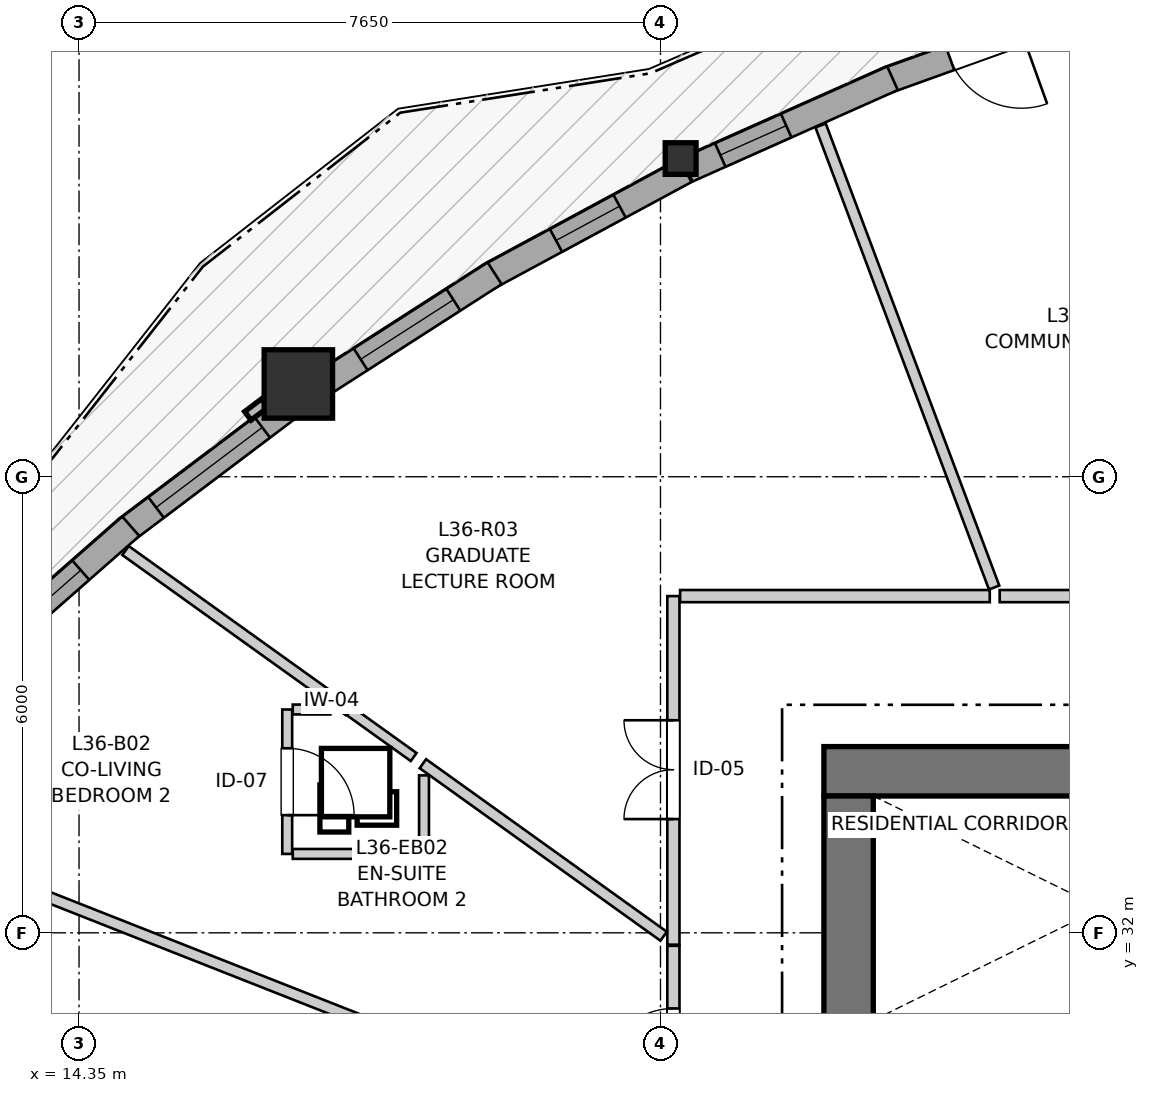
"""IFC4 building model, lengths in metres.
Left out: names, types, materials, properties, quantities, classifications, styles, units other than length and angle.
Written with IfcOpenShell. Run it as: python <this file> out.ifc"""

import sys

from ifc_helpers import new_model, si_unit, direction, frame, frame_2d, origin, origin_2d, place, context, subcontext, project, spatial, rectangle, i_section, extrude, source, transform, mapped, element, fill, save


model = new_model("IFC4")
c1 = context("Model", 3, precision=1e-05, world=origin(), true_north=direction((0.0, 1.0)))
c2 = subcontext(c1, "Body", "Model", "MODEL_VIEW")
j1 = project(units=[si_unit("LENGTHUNIT", "METRE"), si_unit("PLANEANGLEUNIT", "RADIAN")], contexts=[c1])
p1 = place(None, origin())
s1 = spatial("IfcSite", under=j1, at=p1, CompositionType="ELEMENT")
p2 = place(p1, origin())
s2 = spatial("IfcBuilding", under=s1, at=p2, CompositionType="ELEMENT")
p3 = place(p2, frame((0.0, 0.0, 121.6)))
s3 = spatial("IfcBuildingStorey", under=s2, at=p3, CompositionType="ELEMENT", Elevation=121.6)
p4 = place(p3, frame((36.55, 34.125, 0.0), z_axis=(0.0, 0.0, 1.0), x_axis=(-1.0, 0.0, 0.0)))
e1 = element("IfcWall", 1, at=p4, inside=s3, PredefinedType="SHEAR", context=c2, shape_type="SweptSolid", body=[
    extrude(rectangle(XDim=12.4, YDim=0.65, at=frame_2d((6.2, 0.0))), origin(), (0.0, 0.0, 1.0), 2.95),
])
p5 = place(p3, frame((24.475, 33.8, 0.0), z_axis=(0.0, 0.0, 1.0), x_axis=(0.0, -1.0, 0.0)))
e2 = element("IfcWall", 2, at=p5, inside=s3, PredefinedType="SHEAR", context=c2, shape_type="SweptSolid", body=[
    extrude(rectangle(XDim=15.6, YDim=0.65, at=frame_2d((7.8, 0.0))), origin(), (0.0, 0.0, 1.0), 2.95),
])
p6 = place(p5, frame((7.05, 0.0, 0.0)))
e3 = element("IfcOpeningElement", 3, at=p6, cuts=e2, PredefinedType="OPENING", context=c2, shape_type="SweptSolid", body=[
    extrude(rectangle(XDim=1.5, YDim=2.15, at=frame_2d((0.75, 1.075))), frame((0.0, 0.335, 0.0), z_axis=(0.0, -1.0, 0.0), x_axis=(1.0, 0.0, 0.0)), (0.0, 0.0, 1.0), 0.67),
])
p7 = place(p5, frame((3.52, 0.0, 0.0)))
e4 = element("IfcOpeningElement", 4, at=p7, cuts=e2, PredefinedType="OPENING", context=c2, shape_type="SweptSolid", body=[
    extrude(rectangle(XDim=0.86, YDim=2.05, at=frame_2d((0.43, 1.025))), frame((0.0, 0.335, 0.0), z_axis=(0.0, -1.0, 0.0), x_axis=(1.0, 0.0, 0.0)), (0.0, 0.0, 1.0), 0.67),
])
p8 = place(p5, frame((11.22, 0.0, 0.0)))
e5 = element("IfcOpeningElement", 5, at=p8, cuts=e2, PredefinedType="OPENING", context=c2, shape_type="SweptSolid", body=[
    extrude(rectangle(XDim=0.86, YDim=2.05, at=frame_2d((0.43, 1.025))), frame((0.0, 0.335, 0.0), z_axis=(0.0, -1.0, 0.0), x_axis=(1.0, 0.0, 0.0)), (0.0, 0.0, 1.0), 0.67),
])
m1 = source(origin(), c2, "Body", "SweptSolid", [
    extrude(i_section(OverallWidth=0.406, OverallDepth=0.416, WebThickness=0.027, FlangeThickness=0.044, FilletRadius=0.015, at=origin_2d()), origin(), (0.0, 0.0, 1.0), 2.95),
])
p9 = place(p3, frame((22.265, 42.186, 0.0), z_axis=(0.0, 0.0, 1.0), x_axis=(1.0, 0.0, 0.0)))
e6 = element("IfcColumn", 6, at=p9, inside=s3, PredefinedType="PILASTER", context=c2, shape_type="MappedRepresentation", body=[
    mapped(m1, transform((0.0, 0.0, 0.0), x_axis=(1.0, 0.0, 0.0), y_axis=(0.0, 1.0, 0.0), z_axis=(0.0, 0.0, 1.0), scale=1.0)),
])
m2 = source(origin(), c2, "Body", "SweptSolid", [
    extrude(rectangle(XDim=0.9, YDim=0.9, at=origin_2d()), origin(), (0.0, 0.0, 1.0), 2.95),
])
p10 = place(p3, frame((17.236, 39.221, 0.0), z_axis=(0.0, 0.0, 1.0), x_axis=(1.0, 0.0, 0.0)))
e7 = element("IfcColumn", 7, at=p10, inside=s3, PredefinedType="COLUMN", context=c2, shape_type="MappedRepresentation", body=[
    mapped(m2, transform((0.0, 0.0, 0.0), x_axis=(1.0, 0.0, 0.0), y_axis=(0.0, 1.0, 0.0), z_axis=(0.0, 0.0, 1.0), scale=1.0)),
])
p11 = place(p3, frame((27.586, 44.149, 0.0), z_axis=(0.0, 0.0, 1.0), x_axis=(-0.941112277287, -0.338094190338, 0.0)))
e8 = element("IfcWall", 8, at=p11, inside=s3, PredefinedType="SOLIDWALL", context=c2, shape_type="SweptSolid", body=[
    extrude(rectangle(XDim=2.779, YDim=0.34, at=frame_2d((1.39, 0.0))), origin(), (0.0, 0.0, 1.0), 2.48),
])
p12 = place(p11, frame((0.89, 0.0, 0.0)))
e9 = element("IfcOpeningElement", 9, at=p12, cuts=e8, PredefinedType="OPENING", context=c2, shape_type="SweptSolid", body=[
    extrude(rectangle(XDim=1.0, YDim=2.1, at=frame_2d((0.5, 1.05))), frame((0.0, 0.18, 0.0), z_axis=(0.0, -1.0, 0.0), x_axis=(1.0, 0.0, 0.0)), (0.0, 0.0, 1.0), 0.36),
])
p13 = place(p3, frame((25.053, 43.243, 0.0), z_axis=(0.0, 0.0, 1.0), x_axis=(-0.91339900063, -0.407065431655, 0.0)))
e10 = element("IfcWall", 10, at=p13, inside=s3, PredefinedType="SOLIDWALL", context=c2, shape_type="SweptSolid", body=[
    extrude(rectangle(XDim=2.956, YDim=0.34, at=frame_2d((1.478, 0.0))), origin(), (0.0, 0.0, 1.0), 2.48),
])
p14 = place(p13, frame((1.531, 0.0, 0.82)))
e11 = element("IfcOpeningElement", 11, at=p14, cuts=e10, PredefinedType="OPENING", context=c2, shape_type="SweptSolid", body=[
    extrude(rectangle(XDim=0.95, YDim=1.35, at=frame_2d((0.475, 0.675))), frame((0.0, 0.18, 0.0), z_axis=(0.0, -1.0, 0.0), x_axis=(1.0, 0.0, 0.0)), (0.0, 0.0, 1.0), 0.36),
])
p15 = place(p3, frame((22.328, 42.027, 0.0), z_axis=(0.0, 0.0, 1.0), x_axis=(-0.880092136679, -0.474802939077, 0.0)))
e12 = element("IfcWall", 12, at=p15, inside=s3, PredefinedType="SOLIDWALL", context=c2, shape_type="SweptSolid", body=[
    extrude(rectangle(XDim=2.94, YDim=0.34, at=frame_2d((1.47, 0.0))), origin(), (0.0, 0.0, 1.0), 2.48),
])
p16 = place(p15, frame((0.985, 0.0, 0.82)))
e13 = element("IfcOpeningElement", 13, at=p16, cuts=e12, PredefinedType="OPENING", context=c2, shape_type="SweptSolid", body=[
    extrude(rectangle(XDim=0.95, YDim=1.35, at=frame_2d((0.475, 0.675))), frame((0.0, 0.18, 0.0), z_axis=(0.0, -1.0, 0.0), x_axis=(1.0, 0.0, 0.0)), (0.0, 0.0, 1.0), 0.36),
])
p17 = place(p3, frame((19.818, 40.677, 0.0), z_axis=(0.0, 0.0, 1.0), x_axis=(-0.841503814414, -0.540251173369, 0.0)))
e14 = element("IfcWall", 14, at=p17, inside=s3, PredefinedType="SOLIDWALL", context=c2, shape_type="SweptSolid", body=[
    extrude(rectangle(XDim=2.729, YDim=0.34, at=frame_2d((1.365, 0.0))), origin(), (0.0, 0.0, 1.0), 2.48),
])
p18 = place(p17, frame((0.645, 0.0, 0.82)))
e15 = element("IfcOpeningElement", 15, at=p18, cuts=e14, PredefinedType="OPENING", context=c2, shape_type="SweptSolid", body=[
    extrude(rectangle(XDim=1.45, YDim=1.25, at=frame_2d((0.725, 0.625))), frame((0.0, 0.18, 0.0), z_axis=(0.0, -1.0, 0.0), x_axis=(1.0, 0.0, 0.0)), (0.0, 0.0, 1.0), 0.36),
])
p19 = place(p3, frame((17.154, 38.947, 0.0), z_axis=(0.0, 0.0, 1.0), x_axis=(-0.798332692302, -0.602216665663, 0.0)))
e16 = element("IfcWall", 16, at=p19, inside=s3, PredefinedType="SOLIDWALL", context=c2, shape_type="SweptSolid", body=[
    extrude(rectangle(XDim=2.746, YDim=0.34, at=frame_2d((1.373, 0.0))), origin(), (0.0, 0.0, 1.0), 2.48),
])
p20 = place(p19, frame((0.493, 0.0, 0.82)))
e17 = element("IfcOpeningElement", 17, at=p20, cuts=e16, PredefinedType="OPENING", context=c2, shape_type="SweptSolid", body=[
    extrude(rectangle(XDim=1.75, YDim=1.3, at=frame_2d((0.875, 0.65))), frame((0.0, 0.18, 0.0), z_axis=(0.0, -1.0, 0.0), x_axis=(1.0, 0.0, 0.0)), (0.0, 0.0, 1.0), 0.36),
])
p21 = place(p3, frame((15.031, 37.349, 0.0), z_axis=(0.0, 0.0, 1.0), x_axis=(-0.751472812955, -0.659764057364, 0.0)))
e18 = element("IfcWall", 18, at=p21, inside=s3, PredefinedType="SOLIDWALL", context=c2, shape_type="SweptSolid", body=[
    extrude(rectangle(XDim=2.99, YDim=0.34, at=frame_2d((1.495, 0.0))), origin(), (0.0, 0.0, 1.0), 2.48),
])
p22 = place(p21, frame((0.875, 0.0, 0.82)))
e19 = element("IfcOpeningElement", 19, at=p22, cuts=e18, PredefinedType="OPENING", context=c2, shape_type="SweptSolid", body=[
    extrude(rectangle(XDim=1.45, YDim=1.25, at=frame_2d((0.725, 0.625))), frame((0.0, 0.18, 0.0), z_axis=(0.0, -1.0, 0.0), x_axis=(1.0, 0.0, 0.0)), (0.0, 0.0, 1.0), 0.36),
])
p23 = place(p3, frame((22.17, 31.844, 0.0), z_axis=(0.0, 0.0, 1.0), x_axis=(0.0, 1.0, 0.0)))
e20 = element("IfcWall", 20, at=p23, inside=s3, PredefinedType="PARTITIONING", context=c2, shape_type="SweptSolid", body=[
    extrude(rectangle(XDim=4.586, YDim=0.16, at=frame_2d((2.293, 0.0))), origin(), (0.0, 0.0, 1.0), 2.95),
])
p24 = place(p23, frame((1.653, 0.0, 0.0)))
e21 = element("IfcOpeningElement", 21, at=p24, cuts=e20, PredefinedType="OPENING", context=c2, shape_type="SweptSolid", body=[
    extrude(rectangle(XDim=1.3, YDim=2.1, at=frame_2d((0.65, 1.05))), frame((0.0, 0.09, 0.0), z_axis=(0.0, -1.0, 0.0), x_axis=(1.0, 0.0, 0.0)), (0.0, 0.0, 1.0), 0.18),
])
p25 = place(p3, frame((26.463, 36.43, 0.0), z_axis=(0.0, 0.0, 1.0), x_axis=(1.0, 0.0, 0.0)))
e22 = element("IfcWall", 22, at=p25, inside=s3, PredefinedType="PARTITIONING", context=c2, shape_type="SweptSolid", body=[
    extrude(rectangle(XDim=3.585, YDim=0.16, at=frame_2d((1.792, 0.0))), origin(), (0.0, 0.0, 1.0), 2.95),
])
p26 = place(p25, frame((1.119, 0.0, 0.0)))
e23 = element("IfcOpeningElement", 23, at=p26, cuts=e22, PredefinedType="OPENING", context=c2, shape_type="SweptSolid", body=[
    extrude(rectangle(XDim=1.3, YDim=2.1, at=frame_2d((0.65, 1.05))), frame((0.0, 0.09, 0.0), z_axis=(0.0, -1.0, 0.0), x_axis=(1.0, 0.0, 0.0)), (0.0, 0.0, 1.0), 0.18),
])
p27 = place(p3, frame((22.17, 29.209, 0.0), z_axis=(0.0, 0.0, 1.0), x_axis=(0.0, 1.0, 0.0)))
e24 = element("IfcWall", 24, at=p27, inside=s3, PredefinedType="PARTITIONING", context=c2, shape_type="SweptSolid", body=[
    extrude(rectangle(XDim=2.62, YDim=0.16, at=frame_2d((1.31, 0.0))), origin(), (0.0, 0.0, 1.0), 2.95),
])
p28 = place(p27, frame((0.875, 0.0, 0.0)))
e25 = element("IfcOpeningElement", 25, at=p28, cuts=e24, PredefinedType="OPENING", context=c2, shape_type="SweptSolid", body=[
    extrude(rectangle(XDim=0.92, YDim=2.1, at=frame_2d((0.46, 1.05))), frame((0.0, 0.09, 0.0), z_axis=(0.0, -1.0, 0.0), x_axis=(1.0, 0.0, 0.0)), (0.0, 0.0, 1.0), 0.18),
])
p29 = place(p3, frame((17.089, 34.938, 0.0), z_axis=(0.0, 0.0, 1.0), x_axis=(0.0, -1.0, 0.0)))
e26 = element("IfcWall", 26, at=p29, inside=s3, PredefinedType="PARTITIONING", context=c2, shape_type="SweptSolid", body=[
    extrude(rectangle(XDim=1.9, YDim=0.13, at=frame_2d((0.95, 0.0))), origin(), (0.0, 0.0, 1.0), 2.95),
])
p30 = place(p29, frame((0.51, 0.0, 0.0)))
e27 = element("IfcOpeningElement", 27, at=p30, cuts=e26, PredefinedType="OPENING", context=c2, shape_type="SweptSolid", body=[
    extrude(rectangle(XDim=0.88, YDim=2.05, at=frame_2d((0.44, 1.025))), frame((0.0, 0.075, 0.0), z_axis=(0.0, -1.0, 0.0), x_axis=(1.0, 0.0, 0.0)), (0.0, 0.0, 1.0), 0.15),
])
p31 = place(p3, frame((11.228, 33.54, 0.0), z_axis=(0.0, 0.0, 1.0), x_axis=(0.930301058265, -0.366796866114, 0.0)))
e28 = element("IfcWall", 28, at=p31, inside=s3, PredefinedType="PARTITIONING", context=c2, shape_type="SweptSolid", body=[
    extrude(rectangle(XDim=11.639, YDim=0.145, at=frame_2d((5.82, 0.0))), origin(), (0.0, 0.0, 1.0), 2.95),
])
p32 = place(p3, frame((24.107, 42.621, 0.0), z_axis=(0.0, 0.0, 1.0), x_axis=(0.351605509999, -0.93614826034, 0.0)))
e29 = element("IfcWall", 29, at=p32, inside=s3, PredefinedType="PARTITIONING", context=c2, shape_type="SweptSolid", body=[
    extrude(rectangle(XDim=6.493, YDim=0.145, at=frame_2d((3.247, 0.0))), origin(), (0.0, 0.0, 1.0), 2.95),
])
p33 = place(p3, frame((22.258, 36.43, 0.0), z_axis=(0.0, 0.0, 1.0), x_axis=(1.0, 0.0, 0.0)))
e30 = element("IfcWall", 30, at=p33, inside=s3, PredefinedType="PARTITIONING", context=c2, shape_type="SweptSolid", body=[
    extrude(rectangle(XDim=4.074, YDim=0.16, at=frame_2d((2.037, 0.0))), origin(), (0.0, 0.0, 1.0), 2.588),
])
p34 = place(p3, frame((18.874, 34.225, 0.0), z_axis=(0.0, 0.0, 1.0), x_axis=(0.812826521731, -0.582505833079, 0.0)))
e31 = element("IfcWall", 31, at=p34, inside=s3, PredefinedType="PARTITIONING", context=c2, shape_type="SweptSolid", body=[
    extrude(rectangle(XDim=3.896, YDim=0.145, at=frame_2d((1.948, 0.0))), origin(), (0.0, 0.0, 1.0), 2.95),
])
p35 = place(p3, frame((14.961, 37.03, 0.0), z_axis=(0.0, 0.0, 1.0), x_axis=(0.812838437321, -0.582489205748, 0.0)))
e32 = element("IfcWall", 32, at=p35, inside=s3, PredefinedType="PARTITIONING", context=c2, shape_type="SweptSolid", body=[
    extrude(rectangle(XDim=3.616, YDim=0.145, at=frame_2d((1.808, 0.0))), origin(), (0.0, 0.0, 1.0), 2.95),
])
p36 = place(p3, frame((17.162, 33.038, 0.0), z_axis=(0.0, 0.0, 1.0), x_axis=(1.0, 0.0, 0.0)))
e33 = element("IfcWall", 33, at=p36, inside=s3, PredefinedType="PARTITIONING", context=c2, shape_type="SweptSolid", body=[
    extrude(rectangle(XDim=1.727, YDim=0.13, at=frame_2d((0.863, 0.0))), origin(), (0.0, 0.0, 1.0), 2.95),
])
p37 = place(p3, frame((18.889, 33.111, 0.0), z_axis=(0.0, 0.0, 1.0), x_axis=(0.0, 1.0, 0.0)))
e34 = element("IfcWall", 34, at=p37, inside=s3, PredefinedType="PARTITIONING", context=c2, shape_type="SweptSolid", body=[
    extrude(rectangle(XDim=0.96, YDim=0.13, at=frame_2d((0.48, 0.0))), origin(), (0.0, 0.0, 1.0), 2.95),
])
p38 = place(p3, frame((17.913, 34.914, 0.0), z_axis=(0.0, 0.0, 1.0), x_axis=(0.812774229327, -0.582578794792, 0.0)))
e35 = element("IfcWall", 35, at=p38, inside=s3, PredefinedType="PARTITIONING", context=c2, shape_type="SweptSolid", body=[
    extrude(rectangle(XDim=1.033, YDim=0.13, at=frame_2d((0.517, 0.0))), origin(), (0.0, 0.0, 1.0), 2.95),
])
p39 = place(p3, frame((17.162, 34.938, 0.0), z_axis=(0.0, 0.0, 1.0), x_axis=(1.0, 0.0, 0.0)))
e36 = element("IfcWall", 36, at=p39, inside=s3, PredefinedType="PARTITIONING", context=c2, shape_type="SweptSolid", body=[
    extrude(rectangle(XDim=0.495, YDim=0.13, at=frame_2d((0.247, 0.0))), origin(), (0.0, 0.0, 1.0), 2.95),
])
m3 = source(origin(), c2, "Body", "SweptSolid", [
    extrude(rectangle(XDim=0.95, YDim=1.35, at=frame_2d((0.475, 0.675))), frame((0.0, 0.03, 0.0), z_axis=(0.0, -1.0, 0.0), x_axis=(1.0, 0.0, 0.0)), (0.0, 0.0, 1.0), 0.06),
])
p40 = place(p14, origin())
e37 = element("IfcWindow", 37, at=p40, inside=s3, PartitioningType="SINGLE_PANEL", PredefinedType="WINDOW", context=c2, shape_type="MappedRepresentation", body=[
    mapped(m3, transform((0.0, 0.0, 0.0), x_axis=(1.0, 0.0, 0.0), y_axis=(0.0, 1.0, 0.0), z_axis=(0.0, 0.0, 1.0), scale=1.0)),
])
fill(e11, e37)
p41 = place(p16, origin())
e38 = element("IfcWindow", 38, at=p41, inside=s3, PartitioningType="SINGLE_PANEL", PredefinedType="WINDOW", context=c2, shape_type="MappedRepresentation", body=[
    mapped(m3, transform((0.0, 0.0, 0.0), x_axis=(1.0, 0.0, 0.0), y_axis=(0.0, 1.0, 0.0), z_axis=(0.0, 0.0, 1.0), scale=1.0)),
])
fill(e13, e38)
m4 = source(origin(), c2, "Body", "SweptSolid", [
    extrude(rectangle(XDim=1.45, YDim=1.25, at=frame_2d((0.725, 0.625))), frame((0.0, 0.03, 0.0), z_axis=(0.0, -1.0, 0.0), x_axis=(1.0, 0.0, 0.0)), (0.0, 0.0, 1.0), 0.06),
])
p42 = place(p18, origin())
e39 = element("IfcWindow", 39, at=p42, inside=s3, PartitioningType="SINGLE_PANEL", PredefinedType="WINDOW", context=c2, shape_type="MappedRepresentation", body=[
    mapped(m4, transform((0.0, 0.0, 0.0), x_axis=(1.0, 0.0, 0.0), y_axis=(0.0, 1.0, 0.0), z_axis=(0.0, 0.0, 1.0), scale=1.0)),
])
fill(e15, e39)
m5 = source(origin(), c2, "Body", "SweptSolid", [
    extrude(rectangle(XDim=1.75, YDim=1.3, at=frame_2d((0.875, 0.65))), frame((0.0, 0.03, 0.0), z_axis=(0.0, -1.0, 0.0), x_axis=(1.0, 0.0, 0.0)), (0.0, 0.0, 1.0), 0.06),
])
p43 = place(p20, origin())
e40 = element("IfcWindow", 40, at=p43, inside=s3, PartitioningType="SINGLE_PANEL", PredefinedType="WINDOW", context=c2, shape_type="MappedRepresentation", body=[
    mapped(m5, transform((0.0, 0.0, 0.0), x_axis=(1.0, 0.0, 0.0), y_axis=(0.0, 1.0, 0.0), z_axis=(0.0, 0.0, 1.0), scale=1.0)),
])
fill(e17, e40)
p44 = place(p22, origin())
e41 = element("IfcWindow", 41, at=p44, inside=s3, PartitioningType="SINGLE_PANEL", PredefinedType="WINDOW", context=c2, shape_type="MappedRepresentation", body=[
    mapped(m4, transform((0.0, 0.0, 0.0), x_axis=(1.0, 0.0, 0.0), y_axis=(0.0, 1.0, 0.0), z_axis=(0.0, 0.0, 1.0), scale=1.0)),
])
fill(e19, e41)
m6 = source(origin(), c2, "Body", "SweptSolid", [
    extrude(rectangle(XDim=1.0, YDim=2.1, at=frame_2d((0.5, 1.05))), frame((0.0, 0.025, 0.0), z_axis=(0.0, -1.0, 0.0), x_axis=(1.0, 0.0, 0.0)), (0.0, 0.0, 1.0), 0.05),
])
p45 = place(p12, origin())
e42 = element("IfcDoor", 42, at=p45, inside=s3, OperationType="SINGLE_SWING_LEFT", PredefinedType="DOOR", context=c2, shape_type="MappedRepresentation", body=[
    mapped(m6, transform((0.0, 0.0, 0.0), x_axis=(1.0, 0.0, 0.0), y_axis=(0.0, 1.0, 0.0), z_axis=(0.0, 0.0, 1.0), scale=1.0)),
])
fill(e9, e42)
m7 = source(origin(), c2, "Body", "SweptSolid", [
    extrude(rectangle(XDim=1.3, YDim=2.1, at=frame_2d((0.65, 1.05))), frame((0.0, 0.025, 0.0), z_axis=(0.0, -1.0, 0.0), x_axis=(1.0, 0.0, 0.0)), (0.0, 0.0, 1.0), 0.05),
])
p46 = place(p24, origin())
e43 = element("IfcDoor", 43, at=p46, inside=s3, OperationType="DOUBLE_DOOR_SINGLE_SWING", PredefinedType="DOOR", context=c2, shape_type="MappedRepresentation", body=[
    mapped(m7, transform((0.0, 0.0, 0.0), x_axis=(1.0, 0.0, 0.0), y_axis=(0.0, 1.0, 0.0), z_axis=(0.0, 0.0, 1.0), scale=1.0)),
])
fill(e21, e43)
m8 = source(origin(), c2, "Body", "SweptSolid", [
    extrude(rectangle(XDim=0.92, YDim=2.1, at=frame_2d((0.46, 1.05))), frame((0.0, 0.025, 0.0), z_axis=(0.0, -1.0, 0.0), x_axis=(1.0, 0.0, 0.0)), (0.0, 0.0, 1.0), 0.05),
])
p47 = place(p28, origin())
e44 = element("IfcDoor", 44, at=p47, inside=s3, OperationType="SINGLE_SWING_LEFT", PredefinedType="DOOR", context=c2, shape_type="MappedRepresentation", body=[
    mapped(m8, transform((0.0, 0.0, 0.0), x_axis=(1.0, 0.0, 0.0), y_axis=(0.0, 1.0, 0.0), z_axis=(0.0, 0.0, 1.0), scale=1.0)),
])
fill(e25, e44)
m9 = source(origin(), c2, "Body", "SweptSolid", [
    extrude(rectangle(XDim=0.88, YDim=2.05, at=frame_2d((0.44, 1.025))), frame((0.0, 0.025, 0.0), z_axis=(0.0, -1.0, 0.0), x_axis=(1.0, 0.0, 0.0)), (0.0, 0.0, 1.0), 0.05),
])
p48 = place(p30, origin())
e45 = element("IfcDoor", 45, at=p48, inside=s3, OperationType="SINGLE_SWING_RIGHT", PredefinedType="DOOR", context=c2, shape_type="MappedRepresentation", body=[
    mapped(m9, transform((0.0, 0.0, 0.0), x_axis=(1.0, 0.0, 0.0), y_axis=(0.0, 1.0, 0.0), z_axis=(0.0, 0.0, 1.0), scale=1.0)),
])
fill(e27, e45)
save(model, sys.argv[1])
